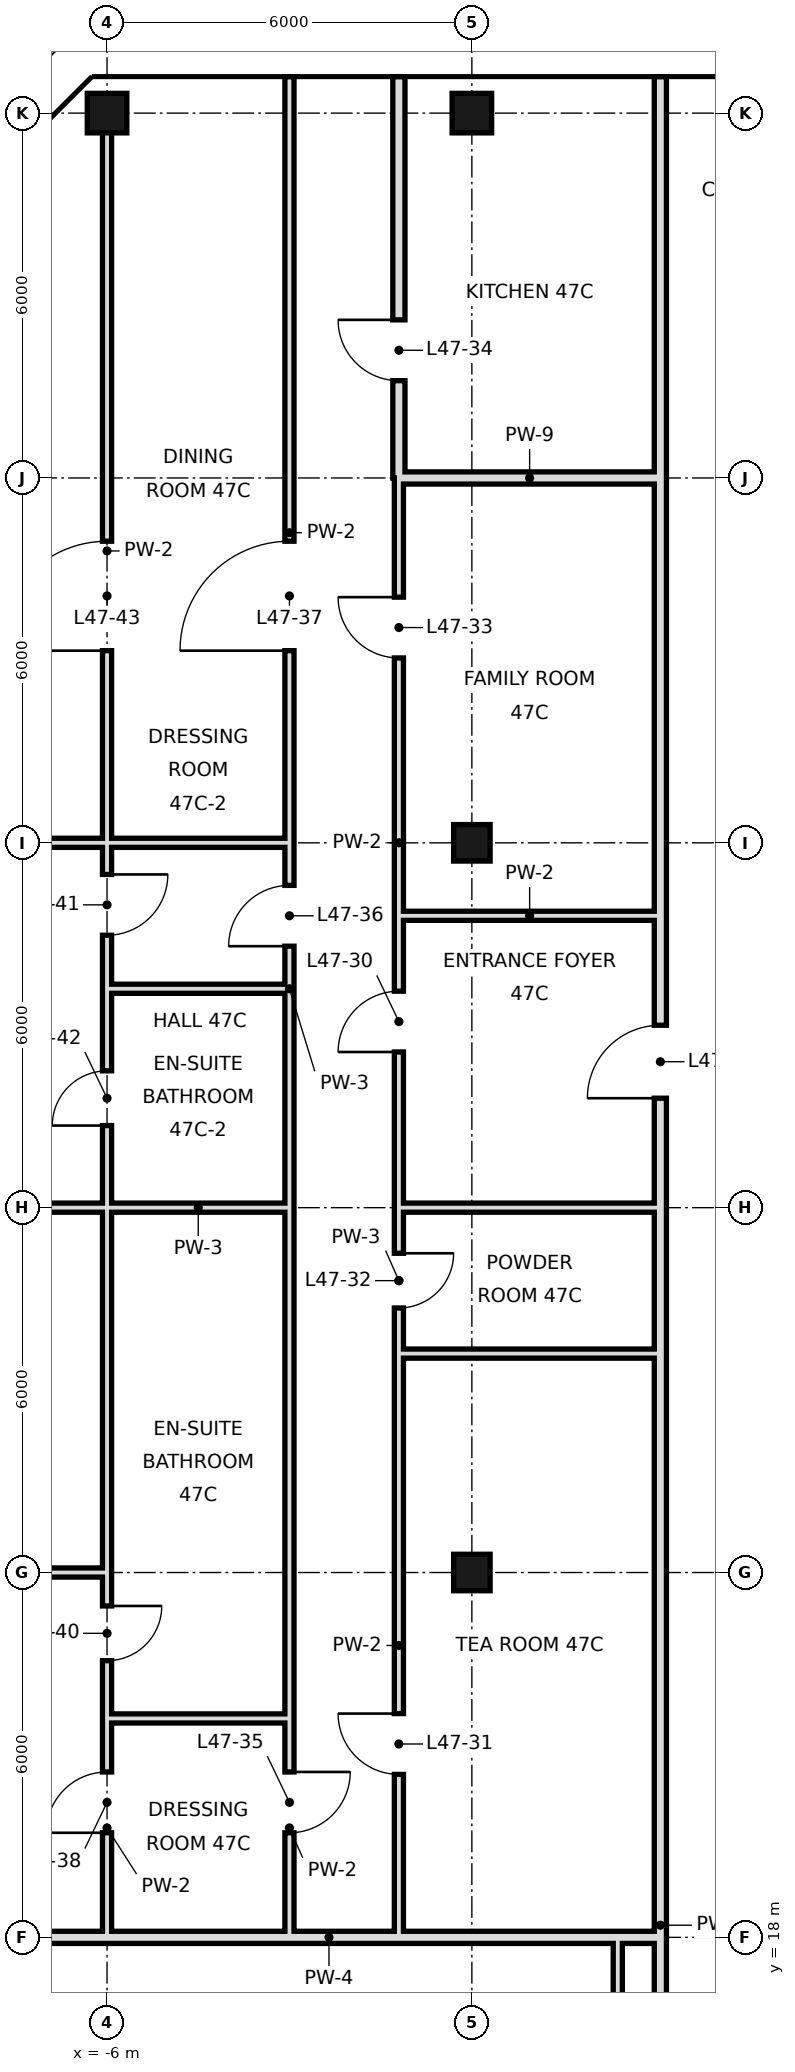
"""IFC4 building model, lengths in metres.
Left out: names, types, materials, properties, quantities, classifications, styles, units other than length and angle.
Written with IfcOpenShell. Run it as: python <this file> out.ifc"""

import sys

from ifc_helpers import new_model, si_unit, direction, frame, frame_2d, origin, origin_2d, place, context, subcontext, project, spatial, rectangle, hollow_rectangle, extrude, element, fill, save


model = new_model("IFC4")
c1 = context("Model", 3, precision=1e-05, world=origin(), true_north=direction((0.0, 1.0)))
c2 = subcontext(c1, "Body", "Model", "MODEL_VIEW")
j1 = project(units=[si_unit("LENGTHUNIT", "METRE"), si_unit("PLANEANGLEUNIT", "RADIAN")], contexts=[c1])
p1 = place(None, origin())
s1 = spatial("IfcSite", under=j1, at=p1, CompositionType="ELEMENT")
p2 = place(p1, origin())
s2 = spatial("IfcBuilding", under=s1, at=p2, CompositionType="ELEMENT")
p3 = place(p2, frame((0.0, 0.0, 202.8)))
s3 = spatial("IfcBuildingStorey", under=s2, at=p3, CompositionType="ELEMENT", Elevation=202.8)
p4 = place(p3, frame((-6.0, 48.0, 0.0), z_axis=(0.0, 0.0, 1.0), x_axis=(1.0, 0.0, 0.0)))
e1 = element("IfcColumn", 1, at=p4, inside=s3, PredefinedType="COLUMN", context=c2, shape_type="SweptSolid", body=[
    extrude(hollow_rectangle(XDim=0.65, YDim=0.65, WallThickness=0.032, at=origin_2d()), origin(), (0.0, 0.0, 1.0), 3.6),
])
for number, where, z_axis, x_axis in (
    (2, (0.0, 24.0, 0.0), (0.0, 0.0, 1.0), (1.0, 0.0, 0.0)),
    (3, (0.0, 36.0, 0.0), (0.0, 0.0, 1.0), (1.0, 0.0, 0.0)),
):
    element("IfcColumn", number, at=place(p3, frame(where, z_axis=z_axis, x_axis=x_axis)), inside=s3, PredefinedType="COLUMN", context=c2, shape_type="SweptSolid", body=[
        extrude(hollow_rectangle(XDim=0.6, YDim=0.6, WallThickness=0.028, at=origin_2d()), origin(), (0.0, 0.0, 1.0), 3.6),
    ])
p5 = place(p3, frame((0.0, 48.0, 0.0), z_axis=(0.0, 0.0, 1.0), x_axis=(1.0, 0.0, 0.0)))
e4 = element("IfcColumn", 4, at=p5, inside=s3, PredefinedType="COLUMN", context=c2, shape_type="SweptSolid", body=[
    extrude(hollow_rectangle(XDim=0.65, YDim=0.65, WallThickness=0.032, at=origin_2d()), origin(), (0.0, 0.0, 1.0), 3.6),
])
p6 = place(p3, frame((-1.2, 42.0, 0.0), z_axis=(0.0, 0.0, 1.0), x_axis=(0.0, 1.0, 0.0)))
e5 = element("IfcWall", 5, at=p6, inside=s3, PredefinedType="SOLIDWALL", context=c2, shape_type="SweptSolid", body=[
    extrude(rectangle(XDim=6.6, YDim=0.2, at=frame_2d((3.3, 0.0))), origin(), (0.0, 0.0, 1.0), 2.72),
])
p7 = place(p6, frame((1.6, 0.0, 0.0)))
e6 = element("IfcOpeningElement", 6, at=p7, cuts=e5, PredefinedType="OPENING", context=c2, shape_type="SweptSolid", body=[
    extrude(rectangle(XDim=1.0, YDim=2.4, at=frame_2d((0.5, 1.2))), frame((0.0, 0.11, 0.0), z_axis=(0.0, -1.0, 0.0), x_axis=(1.0, 0.0, 0.0)), (0.0, 0.0, 1.0), 0.22),
])
p8 = place(p3, frame((-1.2, 18.0, 0.0), z_axis=(0.0, 0.0, 1.0), x_axis=(0.0, 1.0, 0.0)))
e7 = element("IfcWall", 7, at=p8, inside=s3, PredefinedType="PARTITIONING", context=c2, shape_type="SweptSolid", body=[
    extrude(rectangle(XDim=9.6, YDim=0.15, at=frame_2d((4.8, 0.0))), origin(), (0.0, 0.0, 1.0), 3.42),
])
p9 = place(p8, frame((2.68, 0.0, 0.0)))
e8 = element("IfcOpeningElement", 8, at=p9, cuts=e7, PredefinedType="OPENING", context=c2, shape_type="SweptSolid", body=[
    extrude(rectangle(XDim=1.0, YDim=2.4, at=frame_2d((0.5, 1.2))), frame((0.0, 0.085, 0.0), z_axis=(0.0, -1.0, 0.0), x_axis=(1.0, 0.0, 0.0)), (0.0, 0.0, 1.0), 0.17),
])
p10 = place(p3, frame((-1.2, 30.0, 0.0), z_axis=(0.0, 0.0, 1.0), x_axis=(0.0, 1.0, 0.0)))
e9 = element("IfcWall", 9, at=p10, inside=s3, PredefinedType="PARTITIONING", context=c2, shape_type="SweptSolid", body=[
    extrude(rectangle(XDim=12.0, YDim=0.15, at=frame_2d((6.0, 0.0))), origin(), (0.0, 0.0, 1.0), 3.42),
])
p11 = place(p10, frame((2.56, 0.0, 0.0)))
e10 = element("IfcOpeningElement", 10, at=p11, cuts=e9, PredefinedType="OPENING", context=c2, shape_type="SweptSolid", body=[
    extrude(rectangle(XDim=1.0, YDim=2.4, at=frame_2d((0.5, 1.2))), frame((0.0, 0.085, 0.0), z_axis=(0.0, -1.0, 0.0), x_axis=(1.0, 0.0, 0.0)), (0.0, 0.0, 1.0), 0.17),
])
p12 = place(p10, frame((9.04, 0.0, 0.0)))
e11 = element("IfcOpeningElement", 11, at=p12, cuts=e9, PredefinedType="OPENING", context=c2, shape_type="SweptSolid", body=[
    extrude(rectangle(XDim=1.0, YDim=2.4, at=frame_2d((0.5, 1.2))), frame((0.0, 0.085, 0.0), z_axis=(0.0, -1.0, 0.0), x_axis=(1.0, 0.0, 0.0)), (0.0, 0.0, 1.0), 0.17),
])
p13 = place(p3, frame((-1.2, 27.6, 0.0), z_axis=(0.0, 0.0, 1.0), x_axis=(0.0, 1.0, 0.0)))
e12 = element("IfcWall", 12, at=p13, inside=s3, PredefinedType="PARTITIONING", context=c2, shape_type="SweptSolid", body=[
    extrude(rectangle(XDim=2.4, YDim=0.15, at=frame_2d((1.2, 0.0))), origin(), (0.0, 0.0, 1.0), 3.42),
])
p14 = place(p13, frame((0.75, 0.0, 0.0)))
e13 = element("IfcOpeningElement", 13, at=p14, cuts=e12, PredefinedType="OPENING", context=c2, shape_type="SweptSolid", body=[
    extrude(rectangle(XDim=0.9, YDim=2.4, at=frame_2d((0.45, 1.2))), frame((0.0, 0.085, 0.0), z_axis=(0.0, -1.0, 0.0), x_axis=(1.0, 0.0, 0.0)), (0.0, 0.0, 1.0), 0.17),
])
p15 = place(p3, frame((-3.0, 18.0, 0.0), z_axis=(0.0, 0.0, 1.0), x_axis=(0.0, 1.0, 0.0)))
e14 = element("IfcWall", 14, at=p15, inside=s3, PredefinedType="PARTITIONING", context=c2, shape_type="SweptSolid", body=[
    extrude(rectangle(XDim=3.6, YDim=0.15, at=frame_2d((1.8, 0.0))), origin(), (0.0, 0.0, 1.0), 3.42),
])
p16 = place(p15, frame((1.72, 0.0, 0.0)))
e15 = element("IfcOpeningElement", 15, at=p16, cuts=e14, PredefinedType="OPENING", context=c2, shape_type="SweptSolid", body=[
    extrude(rectangle(XDim=1.0, YDim=2.4, at=frame_2d((0.5, 1.2))), frame((0.0, 0.085, 0.0), z_axis=(0.0, -1.0, 0.0), x_axis=(1.0, 0.0, 0.0)), (0.0, 0.0, 1.0), 0.17),
])
p17 = place(p3, frame((-3.0, 33.6, 0.0), z_axis=(0.0, 0.0, 1.0), x_axis=(0.0, 1.0, 0.0)))
e16 = element("IfcWall", 16, at=p17, inside=s3, PredefinedType="PARTITIONING", context=c2, shape_type="SweptSolid", body=[
    extrude(rectangle(XDim=15.0, YDim=0.15, at=frame_2d((7.5, 0.0))), origin(), (0.0, 0.0, 1.0), 3.42),
])
p18 = place(p17, frame((0.7, 0.0, 0.0)))
e17 = element("IfcOpeningElement", 17, at=p18, cuts=e16, PredefinedType="OPENING", context=c2, shape_type="SweptSolid", body=[
    extrude(rectangle(XDim=1.0, YDim=2.4, at=frame_2d((0.5, 1.2))), frame((0.0, 0.085, 0.0), z_axis=(0.0, -1.0, 0.0), x_axis=(1.0, 0.0, 0.0)), (0.0, 0.0, 1.0), 0.17),
])
p19 = place(p17, frame((5.56, 0.0, 0.0)))
e18 = element("IfcOpeningElement", 18, at=p19, cuts=e16, PredefinedType="OPENING", context=c2, shape_type="SweptSolid", body=[
    extrude(rectangle(XDim=1.8, YDim=2.4, at=frame_2d((0.9, 1.2))), frame((0.0, 0.085, 0.0), z_axis=(0.0, -1.0, 0.0), x_axis=(1.0, 0.0, 0.0)), (0.0, 0.0, 1.0), 0.17),
])
p20 = place(p3, frame((-3.0, 21.6, 0.0), z_axis=(0.0, 0.0, 1.0), x_axis=(0.0, 1.0, 0.0)))
e19 = element("IfcWall", 19, at=p20, inside=s3, PredefinedType="PARTITIONING", context=c2, shape_type="SweptSolid", body=[
    extrude(rectangle(XDim=12.0, YDim=0.15, at=frame_2d((6.0, 0.0))), origin(), (0.0, 0.0, 1.0), 3.42),
])
p21 = place(p3, frame((-6.0, 18.0, 0.0), z_axis=(0.0, 0.0, 1.0), x_axis=(0.0, 1.0, 0.0)))
e20 = element("IfcWall", 20, at=p21, inside=s3, PredefinedType="PARTITIONING", context=c2, shape_type="SweptSolid", body=[
    extrude(rectangle(XDim=3.6, YDim=0.15, at=frame_2d((1.8, 0.0))), origin(), (0.0, 0.0, 1.0), 3.42),
])
p22 = place(p21, frame((1.72, 0.0, 0.0)))
e21 = element("IfcOpeningElement", 21, at=p22, cuts=e20, PredefinedType="OPENING", context=c2, shape_type="SweptSolid", body=[
    extrude(rectangle(XDim=1.0, YDim=2.4, at=frame_2d((0.5, 1.2))), frame((0.0, 0.085, 0.0), z_axis=(0.0, -1.0, 0.0), x_axis=(1.0, 0.0, 0.0)), (0.0, 0.0, 1.0), 0.17),
])
p23 = place(p3, frame((-6.0, 33.6, 0.0), z_axis=(0.0, 0.0, 1.0), x_axis=(0.0, 1.0, 0.0)))
e22 = element("IfcWall", 22, at=p23, inside=s3, PredefinedType="PARTITIONING", context=c2, shape_type="SweptSolid", body=[
    extrude(rectangle(XDim=14.4, YDim=0.15, at=frame_2d((7.2, 0.0))), origin(), (0.0, 0.0, 1.0), 3.42),
])
p24 = place(p23, frame((0.88, 0.0, 0.0)))
e23 = element("IfcOpeningElement", 23, at=p24, cuts=e22, PredefinedType="OPENING", context=c2, shape_type="SweptSolid", body=[
    extrude(rectangle(XDim=1.0, YDim=2.4, at=frame_2d((0.5, 1.2))), frame((0.0, 0.085, 0.0), z_axis=(0.0, -1.0, 0.0), x_axis=(1.0, 0.0, 0.0)), (0.0, 0.0, 1.0), 0.17),
])
p25 = place(p23, frame((5.56, 0.0, 0.0)))
e24 = element("IfcOpeningElement", 24, at=p25, cuts=e22, PredefinedType="OPENING", context=c2, shape_type="SweptSolid", body=[
    extrude(rectangle(XDim=1.8, YDim=2.4, at=frame_2d((0.9, 1.2))), frame((0.0, 0.085, 0.0), z_axis=(0.0, -1.0, 0.0), x_axis=(1.0, 0.0, 0.0)), (0.0, 0.0, 1.0), 0.17),
])
p26 = place(p3, frame((-6.0, 21.6, 0.0), z_axis=(0.0, 0.0, 1.0), x_axis=(0.0, 1.0, 0.0)))
e25 = element("IfcWall", 25, at=p26, inside=s3, PredefinedType="PARTITIONING", context=c2, shape_type="SweptSolid", body=[
    extrude(rectangle(XDim=12.0, YDim=0.15, at=frame_2d((6.0, 0.0))), origin(), (0.0, 0.0, 1.0), 3.42),
])
p27 = place(p26, frame((0.95, 0.0, 0.0)))
e26 = element("IfcOpeningElement", 26, at=p27, cuts=e25, PredefinedType="OPENING", context=c2, shape_type="SweptSolid", body=[
    extrude(rectangle(XDim=0.9, YDim=2.4, at=frame_2d((0.45, 1.2))), frame((0.0, 0.085, 0.0), z_axis=(0.0, -1.0, 0.0), x_axis=(1.0, 0.0, 0.0)), (0.0, 0.0, 1.0), 0.17),
])
p28 = place(p26, frame((9.75, 0.0, 0.0)))
e27 = element("IfcOpeningElement", 27, at=p28, cuts=e25, PredefinedType="OPENING", context=c2, shape_type="SweptSolid", body=[
    extrude(rectangle(XDim=0.9, YDim=2.4, at=frame_2d((0.45, 1.2))), frame((0.0, 0.085, 0.0), z_axis=(0.0, -1.0, 0.0), x_axis=(1.0, 0.0, 0.0)), (0.0, 0.0, 1.0), 0.17),
])
p29 = place(p3, frame((2.4, 10.8, 0.0), z_axis=(0.0, 0.0, 1.0), x_axis=(0.0, 1.0, 0.0)))
e28 = element("IfcWall", 28, at=p29, inside=s3, PredefinedType="PARTITIONING", context=c2, shape_type="SweptSolid", body=[
    extrude(rectangle(XDim=7.2, YDim=0.15, at=frame_2d((3.6, 0.0))), origin(), (0.0, 0.0, 1.0), 3.42),
])
p30 = place(p3, frame((3.1, 15.3, 0.0), z_axis=(0.0, 0.0, 1.0), x_axis=(0.0, 1.0, 0.0)))
e29 = element("IfcWall", 29, at=p30, inside=s3, PredefinedType="SOLIDWALL", context=c2, shape_type="SweptSolid", body=[
    extrude(rectangle(XDim=26.7, YDim=0.2, at=frame_2d((13.35, 0.0))), origin(), (0.0, 0.0, 1.0), 2.97),
])
p31 = place(p30, frame((16.5, 0.0, 0.0)))
e30 = element("IfcOpeningElement", 30, at=p31, cuts=e29, PredefinedType="OPENING", context=c2, shape_type="SweptSolid", body=[
    extrude(rectangle(XDim=1.2, YDim=2.4, at=frame_2d((0.6, 1.2))), frame((0.0, 0.11, 0.0), z_axis=(0.0, -1.0, 0.0), x_axis=(1.0, 0.0, 0.0)), (0.0, 0.0, 1.0), 0.22),
])
p32 = place(p3, frame((3.1, 42.0, 0.0), z_axis=(0.0, 0.0, 1.0), x_axis=(0.0, 1.0, 0.0)))
e31 = element("IfcWall", 31, at=p32, inside=s3, PredefinedType="SOLIDWALL", context=c2, shape_type="SweptSolid", body=[
    extrude(rectangle(XDim=6.6, YDim=0.2, at=frame_2d((3.3, 0.0))), origin(), (0.0, 0.0, 1.0), 2.72),
])
p33 = place(p3, frame((-7.8, 18.0, 0.0), z_axis=(0.0, 0.0, 1.0), x_axis=(1.0, 0.0, 0.0)))
e32 = element("IfcWall", 32, at=p33, inside=s3, PredefinedType="SOLIDWALL", context=c2, shape_type="SweptSolid", body=[
    extrude(rectangle(XDim=10.9, YDim=0.2, at=frame_2d((5.45, 0.0))), origin(), (0.0, 0.0, 1.0), 2.72),
])
p34 = place(p3, frame((-6.0, 21.6, 0.0), z_axis=(0.0, 0.0, 1.0), x_axis=(1.0, 0.0, 0.0)))
e33 = element("IfcWall", 33, at=p34, inside=s3, PredefinedType="PARTITIONING", context=c2, shape_type="SweptSolid", body=[
    extrude(rectangle(XDim=3.0, YDim=0.15, at=frame_2d((1.5, 0.0))), origin(), (0.0, 0.0, 1.0), 3.42),
])
p35 = place(p3, frame((-12.0, 24.0, 0.0), z_axis=(0.0, 0.0, 1.0), x_axis=(1.0, 0.0, 0.0)))
e34 = element("IfcWall", 34, at=p35, inside=s3, PredefinedType="PARTITIONING", context=c2, shape_type="SweptSolid", body=[
    extrude(rectangle(XDim=6.0, YDim=0.15, at=frame_2d((3.0, 0.0))), origin(), (0.0, 0.0, 1.0), 2.72),
])
p36 = place(p35, frame((1.6, 0.0, 0.0)))
e35 = element("IfcOpeningElement", 35, at=p36, cuts=e34, PredefinedType="OPENING", context=c2, shape_type="SweptSolid", body=[
    extrude(rectangle(XDim=1.0, YDim=2.4, at=frame_2d((0.5, 1.2))), frame((0.0, 0.085, 0.0), z_axis=(0.0, -1.0, 0.0), x_axis=(1.0, 0.0, 0.0)), (0.0, 0.0, 1.0), 0.17),
])
p37 = place(p3, frame((-1.2, 27.6, 0.0), z_axis=(0.0, 0.0, 1.0), x_axis=(1.0, 0.0, 0.0)))
e36 = element("IfcWall", 36, at=p37, inside=s3, PredefinedType="PARTITIONING", context=c2, shape_type="SweptSolid", body=[
    extrude(rectangle(XDim=4.3, YDim=0.15, at=frame_2d((2.15, 0.0))), origin(), (0.0, 0.0, 1.0), 3.42),
])
p38 = place(p3, frame((-12.6, 30.0, 0.0), z_axis=(0.0, 0.0, 1.0), x_axis=(1.0, 0.0, 0.0)))
e37 = element("IfcWall", 37, at=p38, inside=s3, PredefinedType="PARTITIONING", context=c2, shape_type="SweptSolid", body=[
    extrude(rectangle(XDim=6.6, YDim=0.15, at=frame_2d((3.3, 0.0))), origin(), (0.0, 0.0, 1.0), 2.72),
])
p39 = place(p3, frame((-6.0, 30.0, 0.0), z_axis=(0.0, 0.0, 1.0), x_axis=(1.0, 0.0, 0.0)))
e38 = element("IfcWall", 38, at=p39, inside=s3, PredefinedType="PARTITIONING", context=c2, shape_type="SweptSolid", body=[
    extrude(rectangle(XDim=3.0, YDim=0.15, at=frame_2d((1.5, 0.0))), origin(), (0.0, 0.0, 1.0), 2.72),
])
p40 = place(p3, frame((-1.2, 30.0, 0.0), z_axis=(0.0, 0.0, 1.0), x_axis=(1.0, 0.0, 0.0)))
e39 = element("IfcWall", 39, at=p40, inside=s3, PredefinedType="PARTITIONING", context=c2, shape_type="SweptSolid", body=[
    extrude(rectangle(XDim=4.3, YDim=0.15, at=frame_2d((2.15, 0.0))), origin(), (0.0, 0.0, 1.0), 2.72),
])
p41 = place(p3, frame((-6.0, 33.6, 0.0), z_axis=(0.0, 0.0, 1.0), x_axis=(1.0, 0.0, 0.0)))
e40 = element("IfcWall", 40, at=p41, inside=s3, PredefinedType="PARTITIONING", context=c2, shape_type="SweptSolid", body=[
    extrude(rectangle(XDim=3.0, YDim=0.15, at=frame_2d((1.5, 0.0))), origin(), (0.0, 0.0, 1.0), 3.42),
])
p42 = place(p3, frame((-1.2, 34.8, 0.0), z_axis=(0.0, 0.0, 1.0), x_axis=(1.0, 0.0, 0.0)))
e41 = element("IfcWall", 41, at=p42, inside=s3, PredefinedType="PARTITIONING", context=c2, shape_type="SweptSolid", body=[
    extrude(rectangle(XDim=4.3, YDim=0.15, at=frame_2d((2.15, 0.0))), origin(), (0.0, 0.0, 1.0), 3.42),
])
p43 = place(p3, frame((-12.0, 36.0, 0.0), z_axis=(0.0, 0.0, 1.0), x_axis=(1.0, 0.0, 0.0)))
e42 = element("IfcWall", 42, at=p43, inside=s3, PredefinedType="PARTITIONING", context=c2, shape_type="SweptSolid", body=[
    extrude(rectangle(XDim=9.0, YDim=0.15, at=frame_2d((4.5, 0.0))), origin(), (0.0, 0.0, 1.0), 2.72),
])
p44 = place(p3, frame((-1.2, 42.0, 0.0), z_axis=(0.0, 0.0, 1.0), x_axis=(1.0, 0.0, 0.0)))
e43 = element("IfcWall", 43, at=p44, inside=s3, PredefinedType="SOLIDWALL", context=c2, shape_type="SweptSolid", body=[
    extrude(rectangle(XDim=4.3, YDim=0.2, at=frame_2d((2.15, 0.0))), origin(), (0.0, 0.0, 1.0), 2.72),
])
p45 = place(p11, origin())
e44 = element("IfcDoor", 44, at=p45, inside=s3, OperationType="SINGLE_SWING_LEFT", PredefinedType="DOOR", context=c2, shape_type="SweptSolid", body=[
    extrude(rectangle(XDim=1.0, YDim=2.4, at=frame_2d((0.5, 1.2))), frame((0.0, 0.025, 0.0), z_axis=(0.0, -1.0, 0.0), x_axis=(1.0, 0.0, 0.0)), (0.0, 0.0, 1.0), 0.05),
])
fill(e10, e44)
p46 = place(p9, frame((1.0, 0.0, 0.0), z_axis=(0.0, 0.0, 1.0), x_axis=(-1.0, 0.0, 0.0)))
e45 = element("IfcDoor", 45, at=p46, inside=s3, OperationType="SINGLE_SWING_LEFT", PredefinedType="DOOR", context=c2, shape_type="SweptSolid", body=[
    extrude(rectangle(XDim=1.0, YDim=2.4, at=frame_2d((0.5, 1.2))), frame((0.0, 0.025, 0.0), z_axis=(0.0, -1.0, 0.0), x_axis=(1.0, 0.0, 0.0)), (0.0, 0.0, 1.0), 0.05),
])
fill(e8, e45)
p47 = place(p14, origin())
e46 = element("IfcDoor", 46, at=p47, inside=s3, OperationType="SINGLE_SWING_RIGHT", PredefinedType="DOOR", context=c2, shape_type="SweptSolid", body=[
    extrude(rectangle(XDim=0.9, YDim=2.4, at=frame_2d((0.45, 1.2))), frame((0.0, 0.025, 0.0), z_axis=(0.0, -1.0, 0.0), x_axis=(1.0, 0.0, 0.0)), (0.0, 0.0, 1.0), 0.05),
])
fill(e13, e46)
p48 = place(p12, frame((1.0, 0.0, 0.0), z_axis=(0.0, 0.0, 1.0), x_axis=(-1.0, 0.0, 0.0)))
e47 = element("IfcDoor", 47, at=p48, inside=s3, OperationType="SINGLE_SWING_LEFT", PredefinedType="DOOR", context=c2, shape_type="SweptSolid", body=[
    extrude(rectangle(XDim=1.0, YDim=2.4, at=frame_2d((0.5, 1.2))), frame((0.0, 0.025, 0.0), z_axis=(0.0, -1.0, 0.0), x_axis=(1.0, 0.0, 0.0)), (0.0, 0.0, 1.0), 0.05),
])
fill(e11, e47)
p49 = place(p7, frame((1.0, 0.0, 0.0), z_axis=(0.0, 0.0, 1.0), x_axis=(-1.0, 0.0, 0.0)))
e48 = element("IfcDoor", 48, at=p49, inside=s3, OperationType="SINGLE_SWING_LEFT", PredefinedType="DOOR", context=c2, shape_type="SweptSolid", body=[
    extrude(rectangle(XDim=1.0, YDim=2.4, at=frame_2d((0.5, 1.2))), frame((0.0, 0.025, 0.0), z_axis=(0.0, -1.0, 0.0), x_axis=(1.0, 0.0, 0.0)), (0.0, 0.0, 1.0), 0.05),
])
fill(e6, e48)
p50 = place(p16, origin())
e49 = element("IfcDoor", 49, at=p50, inside=s3, OperationType="SINGLE_SWING_RIGHT", PredefinedType="DOOR", context=c2, shape_type="SweptSolid", body=[
    extrude(rectangle(XDim=1.0, YDim=2.4, at=frame_2d((0.5, 1.2))), frame((0.0, 0.025, 0.0), z_axis=(0.0, -1.0, 0.0), x_axis=(1.0, 0.0, 0.0)), (0.0, 0.0, 1.0), 0.05),
])
fill(e15, e49)
p51 = place(p18, origin())
e50 = element("IfcDoor", 50, at=p51, inside=s3, OperationType="SINGLE_SWING_LEFT", PredefinedType="DOOR", context=c2, shape_type="SweptSolid", body=[
    extrude(rectangle(XDim=1.0, YDim=2.4, at=frame_2d((0.5, 1.2))), frame((0.0, 0.025, 0.0), z_axis=(0.0, -1.0, 0.0), x_axis=(1.0, 0.0, 0.0)), (0.0, 0.0, 1.0), 0.05),
])
fill(e17, e50)
p52 = place(p19, origin())
e51 = element("IfcDoor", 51, at=p52, inside=s3, OperationType="SINGLE_SWING_LEFT", PredefinedType="DOOR", context=c2, shape_type="SweptSolid", body=[
    extrude(rectangle(XDim=1.8, YDim=2.4, at=frame_2d((0.9, 1.2))), frame((0.0, 0.025, 0.0), z_axis=(0.0, -1.0, 0.0), x_axis=(1.0, 0.0, 0.0)), (0.0, 0.0, 1.0), 0.05),
])
fill(e18, e51)
p53 = place(p22, origin())
e52 = element("IfcDoor", 52, at=p53, inside=s3, OperationType="SINGLE_SWING_LEFT", PredefinedType="DOOR", context=c2, shape_type="SweptSolid", body=[
    extrude(rectangle(XDim=1.0, YDim=2.4, at=frame_2d((0.5, 1.2))), frame((0.0, 0.025, 0.0), z_axis=(0.0, -1.0, 0.0), x_axis=(1.0, 0.0, 0.0)), (0.0, 0.0, 1.0), 0.05),
])
fill(e21, e52)
p54 = place(p27, origin())
e53 = element("IfcDoor", 53, at=p54, inside=s3, OperationType="SINGLE_SWING_RIGHT", PredefinedType="DOOR", context=c2, shape_type="SweptSolid", body=[
    extrude(rectangle(XDim=0.9, YDim=2.4, at=frame_2d((0.45, 1.2))), frame((0.0, 0.025, 0.0), z_axis=(0.0, -1.0, 0.0), x_axis=(1.0, 0.0, 0.0)), (0.0, 0.0, 1.0), 0.05),
])
fill(e26, e53)
p55 = place(p24, origin())
e54 = element("IfcDoor", 54, at=p55, inside=s3, OperationType="SINGLE_SWING_RIGHT", PredefinedType="DOOR", context=c2, shape_type="SweptSolid", body=[
    extrude(rectangle(XDim=1.0, YDim=2.4, at=frame_2d((0.5, 1.2))), frame((0.0, 0.025, 0.0), z_axis=(0.0, -1.0, 0.0), x_axis=(1.0, 0.0, 0.0)), (0.0, 0.0, 1.0), 0.05),
])
fill(e23, e54)
p56 = place(p28, origin())
e55 = element("IfcDoor", 55, at=p56, inside=s3, OperationType="SINGLE_SWING_LEFT", PredefinedType="DOOR", context=c2, shape_type="SweptSolid", body=[
    extrude(rectangle(XDim=0.9, YDim=2.4, at=frame_2d((0.45, 1.2))), frame((0.0, 0.025, 0.0), z_axis=(0.0, -1.0, 0.0), x_axis=(1.0, 0.0, 0.0)), (0.0, 0.0, 1.0), 0.05),
])
fill(e27, e55)
p57 = place(p25, origin())
e56 = element("IfcDoor", 56, at=p57, inside=s3, OperationType="SINGLE_SWING_LEFT", PredefinedType="DOOR", context=c2, shape_type="SweptSolid", body=[
    extrude(rectangle(XDim=1.8, YDim=2.4, at=frame_2d((0.9, 1.2))), frame((0.0, 0.025, 0.0), z_axis=(0.0, -1.0, 0.0), x_axis=(1.0, 0.0, 0.0)), (0.0, 0.0, 1.0), 0.05),
])
fill(e24, e56)
p58 = place(p31, origin())
e57 = element("IfcDoor", 57, at=p58, inside=s3, OperationType="SINGLE_SWING_LEFT", PredefinedType="DOOR", context=c2, shape_type="SweptSolid", body=[
    extrude(rectangle(XDim=1.2, YDim=2.4, at=frame_2d((0.6, 1.2))), frame((0.0, 0.025, 0.0), z_axis=(0.0, -1.0, 0.0), x_axis=(1.0, 0.0, 0.0)), (0.0, 0.0, 1.0), 0.05),
])
fill(e30, e57)
save(model, sys.argv[1])
